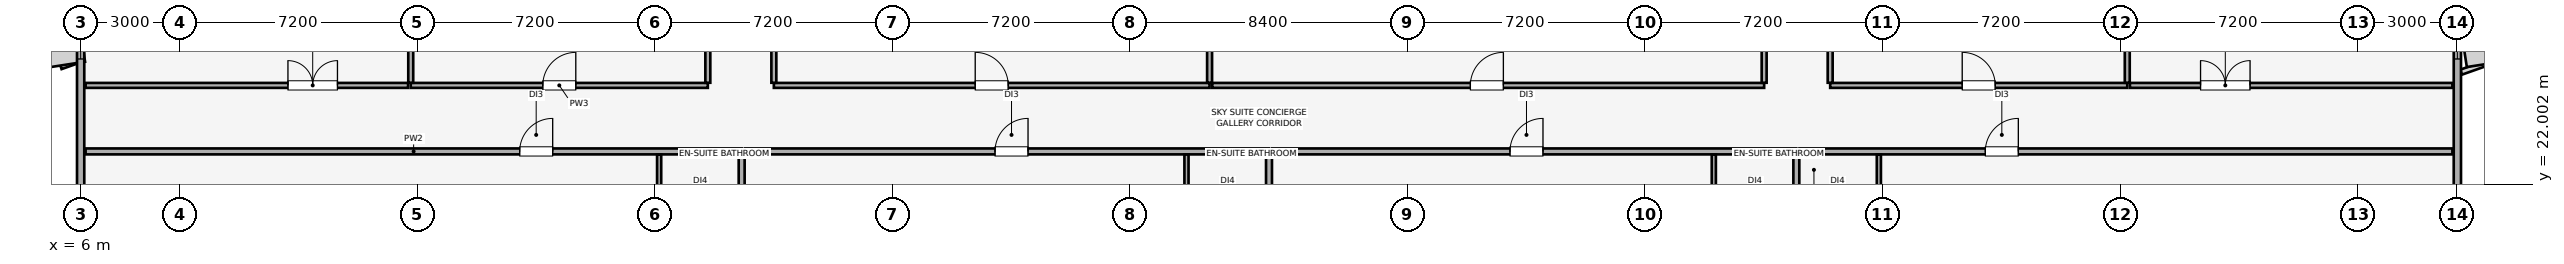
"""IFC4 building model, lengths in metres.
Left out: names, types, materials, properties, quantities, classifications, styles, units other than length and angle.
Written with IfcOpenShell. Run it as: python <this file> out.ifc"""

import sys

from ifc_helpers import new_model, si_unit, direction, frame, frame_2d, origin, place, context, subcontext, project, spatial, rectangle, extrude, element, fill, save


model = new_model("IFC4")
c1 = context("Model", 3, precision=1e-05, world=origin(), true_north=direction((0.0, 1.0)))
c2 = subcontext(c1, "Body", "Model", "MODEL_VIEW")
j1 = project(units=[si_unit("LENGTHUNIT", "METRE"), si_unit("PLANEANGLEUNIT", "RADIAN")], contexts=[c1])
p1 = place(None, origin())
s1 = spatial("IfcSite", under=j1, at=p1, CompositionType="ELEMENT")
p2 = place(p1, origin())
s2 = spatial("IfcBuilding", under=s1, at=p2, CompositionType="ELEMENT")
p3 = place(p2, frame((0.0, 0.0, 276.55)))
s3 = spatial("IfcBuildingStorey", under=s2, at=p3, CompositionType="ELEMENT", Elevation=276.55)
p4 = place(p3, frame((78.0, 9.8, 0.0), z_axis=(0.0, 0.0, 1.0), x_axis=(0.0, 1.0, 0.0)))
e1 = element("IfcWall", 1, at=p4, inside=s3, PredefinedType="SOLIDWALL", context=c2, shape_type="SweptSolid", body=[
    extrude(rectangle(XDim=35.4, YDim=0.22, at=frame_2d((17.7, 0.0))), origin(), (0.0, 0.0, 1.0), 2.8),
])
p5 = place(p4, frame((0.985, 0.0, 0.85)))
e2 = element("IfcOpeningElement", 2, at=p5, cuts=e1, PredefinedType="OPENING", context=c2, shape_type="SweptSolid", body=[
    extrude(rectangle(XDim=3.0, YDim=1.5, at=frame_2d((1.5, 0.75))), frame((0.0, 0.12, 0.0), z_axis=(0.0, -1.0, 0.0), x_axis=(1.0, 0.0, 0.0)), (0.0, 0.0, 1.0), 0.24),
])
p6 = place(p4, frame((7.6, 0.0, 0.85)))
e3 = element("IfcOpeningElement", 3, at=p6, cuts=e1, PredefinedType="OPENING", context=c2, shape_type="SweptSolid", body=[
    extrude(rectangle(XDim=3.6, YDim=1.65, at=frame_2d((1.8, 0.825))), frame((0.0, 0.12, 0.0), z_axis=(0.0, -1.0, 0.0), x_axis=(1.0, 0.0, 0.0)), (0.0, 0.0, 1.0), 0.24),
])
p7 = place(p4, frame((16.0, 0.0, 0.85)))
e4 = element("IfcOpeningElement", 4, at=p7, cuts=e1, PredefinedType="OPENING", context=c2, shape_type="SweptSolid", body=[
    extrude(rectangle(XDim=2.4, YDim=1.5, at=frame_2d((1.2, 0.75))), frame((0.0, 0.12, 0.0), z_axis=(0.0, -1.0, 0.0), x_axis=(1.0, 0.0, 0.0)), (0.0, 0.0, 1.0), 0.24),
])
p8 = place(p4, frame((20.815, 0.0, 0.85)))
e5 = element("IfcOpeningElement", 5, at=p8, cuts=e1, PredefinedType="OPENING", context=c2, shape_type="SweptSolid", body=[
    extrude(rectangle(XDim=3.0, YDim=1.5, at=frame_2d((1.5, 0.75))), frame((0.0, 0.12, 0.0), z_axis=(0.0, -1.0, 0.0), x_axis=(1.0, 0.0, 0.0)), (0.0, 0.0, 1.0), 0.24),
])
p9 = place(p4, frame((25.585, 0.0, 0.85)))
e6 = element("IfcOpeningElement", 6, at=p9, cuts=e1, PredefinedType="OPENING", context=c2, shape_type="SweptSolid", body=[
    extrude(rectangle(XDim=3.0, YDim=1.5, at=frame_2d((1.5, 0.75))), frame((0.0, 0.12, 0.0), z_axis=(0.0, -1.0, 0.0), x_axis=(1.0, 0.0, 0.0)), (0.0, 0.0, 1.0), 0.24),
])
p10 = place(p4, frame((30.915, 0.0, 0.85)))
e7 = element("IfcOpeningElement", 7, at=p10, cuts=e1, PredefinedType="OPENING", context=c2, shape_type="SweptSolid", body=[
    extrude(rectangle(XDim=3.6, YDim=1.65, at=frame_2d((1.8, 0.825))), frame((0.0, 0.12, 0.0), z_axis=(0.0, -1.0, 0.0), x_axis=(1.0, 0.0, 0.0)), (0.0, 0.0, 1.0), 0.24),
])
p11 = place(p3, frame((6.0, 45.2, 0.0), z_axis=(0.0, 0.0, 1.0), x_axis=(0.0, -1.0, 0.0)))
e8 = element("IfcWall", 8, at=p11, inside=s3, PredefinedType="SOLIDWALL", context=c2, shape_type="SweptSolid", body=[
    extrude(rectangle(XDim=35.4, YDim=0.22, at=frame_2d((17.7, 0.0))), origin(), (0.0, 0.0, 1.0), 2.8),
])
p12 = place(p11, frame((31.415, 0.0, 0.85)))
e9 = element("IfcOpeningElement", 9, at=p12, cuts=e8, PredefinedType="OPENING", context=c2, shape_type="SweptSolid", body=[
    extrude(rectangle(XDim=3.0, YDim=1.5, at=frame_2d((1.5, 0.75))), frame((0.0, 0.12, 0.0), z_axis=(0.0, -1.0, 0.0), x_axis=(1.0, 0.0, 0.0)), (0.0, 0.0, 1.0), 0.24),
])
p13 = place(p11, frame((24.2, 0.0, 0.85)))
e10 = element("IfcOpeningElement", 10, at=p13, cuts=e8, PredefinedType="OPENING", context=c2, shape_type="SweptSolid", body=[
    extrude(rectangle(XDim=3.6, YDim=1.65, at=frame_2d((1.8, 0.825))), frame((0.0, 0.12, 0.0), z_axis=(0.0, -1.0, 0.0), x_axis=(1.0, 0.0, 0.0)), (0.0, 0.0, 1.0), 0.24),
])
p14 = place(p11, frame((17.0, 0.0, 0.85)))
e11 = element("IfcOpeningElement", 11, at=p14, cuts=e8, PredefinedType="OPENING", context=c2, shape_type="SweptSolid", body=[
    extrude(rectangle(XDim=2.4, YDim=1.5, at=frame_2d((1.2, 0.75))), frame((0.0, 0.12, 0.0), z_axis=(0.0, -1.0, 0.0), x_axis=(1.0, 0.0, 0.0)), (0.0, 0.0, 1.0), 0.24),
])
p15 = place(p11, frame((11.585, 0.0, 0.85)))
e12 = element("IfcOpeningElement", 12, at=p15, cuts=e8, PredefinedType="OPENING", context=c2, shape_type="SweptSolid", body=[
    extrude(rectangle(XDim=3.0, YDim=1.5, at=frame_2d((1.5, 0.75))), frame((0.0, 0.12, 0.0), z_axis=(0.0, -1.0, 0.0), x_axis=(1.0, 0.0, 0.0)), (0.0, 0.0, 1.0), 0.24),
])
p16 = place(p11, frame((6.815, 0.0, 0.85)))
e13 = element("IfcOpeningElement", 13, at=p16, cuts=e8, PredefinedType="OPENING", context=c2, shape_type="SweptSolid", body=[
    extrude(rectangle(XDim=3.0, YDim=1.5, at=frame_2d((1.5, 0.75))), frame((0.0, 0.12, 0.0), z_axis=(0.0, -1.0, 0.0), x_axis=(1.0, 0.0, 0.0)), (0.0, 0.0, 1.0), 0.24),
])
p17 = place(p11, frame((0.885, 0.0, 0.85)))
e14 = element("IfcOpeningElement", 14, at=p17, cuts=e8, PredefinedType="OPENING", context=c2, shape_type="SweptSolid", body=[
    extrude(rectangle(XDim=3.6, YDim=1.65, at=frame_2d((1.8, 0.825))), frame((0.0, 0.12, 0.0), z_axis=(0.0, -1.0, 0.0), x_axis=(1.0, 0.0, 0.0)), (0.0, 0.0, 1.0), 0.24),
])
p18 = place(p3, frame((6.15, 23.0, 0.0), z_axis=(0.0, 0.0, 1.0), x_axis=(1.0, 0.0, 0.0)))
e15 = element("IfcWall", 15, at=p18, inside=s3, PredefinedType="PARTITIONING", context=c2, shape_type="SweptSolid", body=[
    extrude(rectangle(XDim=19.875, YDim=0.18, at=frame_2d((9.938, 0.0))), origin(), (0.0, 0.0, 1.0), 3.6),
])
p19 = place(p18, frame((13.15, 0.0, 0.0)))
e16 = element("IfcOpeningElement", 16, at=p19, cuts=e15, PredefinedType="OPENING", context=c2, shape_type="SweptSolid", body=[
    extrude(rectangle(XDim=1.0, YDim=2.15, at=frame_2d((0.5, 1.075))), frame((0.0, 0.1, 0.0), z_axis=(0.0, -1.0, 0.0), x_axis=(1.0, 0.0, 0.0)), (0.0, 0.0, 1.0), 0.2),
])
p20 = place(p3, frame((26.025, 6.15, 0.0), z_axis=(0.0, 0.0, 1.0), x_axis=(0.0, 1.0, 0.0)))
e17 = element("IfcWall", 17, at=p20, inside=s3, PredefinedType="PARTITIONING", context=c2, shape_type="SweptSolid", body=[
    extrude(rectangle(XDim=16.755, YDim=0.18, at=frame_2d((8.377, 0.0))), origin(), (0.0, 0.0, 1.0), 3.6),
])
p21 = place(p3, frame((23.525, 20.518, 0.0), z_axis=(0.0, 0.0, 1.0), x_axis=(0.0, 1.0, 0.0)))
e18 = element("IfcWall", 18, at=p21, inside=s3, PredefinedType="PARTITIONING", context=c2, shape_type="SweptSolid", body=[
    extrude(rectangle(XDim=2.387, YDim=0.125, at=frame_2d((1.194, 0.0))), origin(), (0.0, 0.0, 1.0), 3.1),
])
p22 = place(p3, frame((26.12, 23.0, 0.0), z_axis=(0.0, 0.0, 1.0), x_axis=(1.0, 0.0, 0.0)))
e19 = element("IfcWall", 19, at=p22, inside=s3, PredefinedType="PARTITIONING", context=c2, shape_type="SweptSolid", body=[
    extrude(rectangle(XDim=15.88, YDim=0.18, at=frame_2d((7.94, 0.0))), origin(), (0.0, 0.0, 1.0), 3.6),
])
p23 = place(p22, frame((7.58, 0.0, 0.0)))
e20 = element("IfcOpeningElement", 20, at=p23, cuts=e19, PredefinedType="OPENING", context=c2, shape_type="SweptSolid", body=[
    extrude(rectangle(XDim=1.0, YDim=2.15, at=frame_2d((0.5, 1.075))), frame((0.0, 0.1, 0.0), z_axis=(0.0, -1.0, 0.0), x_axis=(1.0, 0.0, 0.0)), (0.0, 0.0, 1.0), 0.2),
])
p24 = place(p3, frame((42.0, 6.15, 0.0), z_axis=(0.0, 0.0, 1.0), x_axis=(0.0, 1.0, 0.0)))
e21 = element("IfcWall", 21, at=p24, inside=s3, PredefinedType="PARTITIONING", context=c2, shape_type="SweptSolid", body=[
    extrude(rectangle(XDim=16.755, YDim=0.18, at=frame_2d((8.377, 0.0))), origin(), (0.0, 0.0, 1.0), 3.0),
])
p25 = place(p3, frame((39.5, 20.518, 0.0), z_axis=(0.0, 0.0, 1.0), x_axis=(0.0, 1.0, 0.0)))
e22 = element("IfcWall", 22, at=p25, inside=s3, PredefinedType="PARTITIONING", context=c2, shape_type="SweptSolid", body=[
    extrude(rectangle(XDim=2.387, YDim=0.125, at=frame_2d((1.194, 0.0))), origin(), (0.0, 0.0, 1.0), 3.6),
])
p26 = place(p3, frame((42.095, 23.0, 0.0), z_axis=(0.0, 0.0, 1.0), x_axis=(1.0, 0.0, 0.0)))
e23 = element("IfcWall", 23, at=p26, inside=s3, PredefinedType="PARTITIONING", context=c2, shape_type="SweptSolid", body=[
    extrude(rectangle(XDim=15.88, YDim=0.18, at=frame_2d((7.94, 0.0))), origin(), (0.0, 0.0, 1.0), 3.6),
])
p27 = place(p26, frame((7.205, 0.0, 0.0)))
e24 = element("IfcOpeningElement", 24, at=p27, cuts=e23, PredefinedType="OPENING", context=c2, shape_type="SweptSolid", body=[
    extrude(rectangle(XDim=1.0, YDim=2.15, at=frame_2d((0.5, 1.075))), frame((0.0, 0.1, 0.0), z_axis=(0.0, -1.0, 0.0), x_axis=(1.0, 0.0, 0.0)), (0.0, 0.0, 1.0), 0.2),
])
p28 = place(p3, frame((57.975, 6.15, 0.0), z_axis=(0.0, 0.0, 1.0), x_axis=(0.0, 1.0, 0.0)))
e25 = element("IfcWall", 25, at=p28, inside=s3, PredefinedType="PARTITIONING", context=c2, shape_type="SweptSolid", body=[
    extrude(rectangle(XDim=16.755, YDim=0.18, at=frame_2d((8.377, 0.0))), origin(), (0.0, 0.0, 1.0), 3.6),
])
p29 = place(p3, frame((55.475, 20.518, 0.0), z_axis=(0.0, 0.0, 1.0), x_axis=(0.0, 1.0, 0.0)))
e26 = element("IfcWall", 26, at=p29, inside=s3, PredefinedType="PARTITIONING", context=c2, shape_type="SweptSolid", body=[
    extrude(rectangle(XDim=2.387, YDim=0.125, at=frame_2d((1.194, 0.0))), origin(), (0.0, 0.0, 1.0), 3.6),
])
p30 = place(p3, frame((58.07, 23.0, 0.0), z_axis=(0.0, 0.0, 1.0), x_axis=(1.0, 0.0, 0.0)))
e27 = element("IfcWall", 27, at=p30, inside=s3, PredefinedType="PARTITIONING", context=c2, shape_type="SweptSolid", body=[
    extrude(rectangle(XDim=19.78, YDim=0.18, at=frame_2d((9.89, 0.0))), origin(), (0.0, 0.0, 1.0), 3.6),
])
p31 = place(p30, frame((5.63, 0.0, 0.0)))
e28 = element("IfcOpeningElement", 28, at=p31, cuts=e27, PredefinedType="OPENING", context=c2, shape_type="SweptSolid", body=[
    extrude(rectangle(XDim=1.0, YDim=2.15, at=frame_2d((0.5, 1.075))), frame((0.0, 0.1, 0.0), z_axis=(0.0, -1.0, 0.0), x_axis=(1.0, 0.0, 0.0)), (0.0, 0.0, 1.0), 0.2),
])
p32 = place(p3, frame((60.475, 20.518, 0.0), z_axis=(0.0, 0.0, 1.0), x_axis=(0.0, 1.0, 0.0)))
e29 = element("IfcWall", 29, at=p32, inside=s3, PredefinedType="PARTITIONING", context=c2, shape_type="SweptSolid", body=[
    extrude(rectangle(XDim=2.387, YDim=0.125, at=frame_2d((1.194, 0.0))), origin(), (0.0, 0.0, 1.0), 3.1),
])
p33 = place(p3, frame((16.0, 25.0, 0.0), z_axis=(0.0, 0.0, 1.0), x_axis=(1.0, 0.0, 0.0)))
e30 = element("IfcWall", 30, at=p33, inside=s3, PredefinedType="PARTITIONING", context=c2, shape_type="SweptSolid", body=[
    extrude(rectangle(XDim=9.0, YDim=0.15, at=frame_2d((4.5, 0.0))), origin(), (0.0, 0.0, 1.0), 3.6),
])
p34 = place(p33, frame((4.0, 0.0, 0.0)))
e31 = element("IfcOpeningElement", 31, at=p34, cuts=e30, PredefinedType="OPENING", context=c2, shape_type="SweptSolid", body=[
    extrude(rectangle(XDim=1.0, YDim=2.15, at=frame_2d((0.5, 1.075))), frame((0.0, 0.085, 0.0), z_axis=(0.0, -1.0, 0.0), x_axis=(1.0, 0.0, 0.0)), (0.0, 0.0, 1.0), 0.17),
])
p35 = place(p3, frame((16.0, 25.08, 0.0), z_axis=(0.0, 0.0, 1.0), x_axis=(0.0, 1.0, 0.0)))
e32 = element("IfcWall", 32, at=p35, inside=s3, PredefinedType="PARTITIONING", context=c2, shape_type="SweptSolid", body=[
    extrude(rectangle(XDim=4.31, YDim=0.15, at=frame_2d((2.155, 0.0))), origin(), (0.0, 0.0, 1.0), 3.1),
])
p36 = place(p3, frame((25.0, 25.08, 0.0), z_axis=(0.0, 0.0, 1.0), x_axis=(0.0, 1.0, 0.0)))
e33 = element("IfcWall", 33, at=p36, inside=s3, PredefinedType="PARTITIONING", context=c2, shape_type="SweptSolid", body=[
    extrude(rectangle(XDim=4.24, YDim=0.15, at=frame_2d((2.12, 0.0))), origin(), (0.0, 0.0, 1.0), 3.6),
])
p37 = place(p3, frame((27.0, 25.0, 0.0), z_axis=(0.0, 0.0, 1.0), x_axis=(1.0, 0.0, 0.0)))
e34 = element("IfcWall", 34, at=p37, inside=s3, PredefinedType="PARTITIONING", context=c2, shape_type="SweptSolid", body=[
    extrude(rectangle(XDim=13.2, YDim=0.15, at=frame_2d((6.6, 0.0))), origin(), (0.0, 0.0, 1.0), 3.6),
])
p38 = place(p37, frame((6.1, 0.0, 0.0)))
e35 = element("IfcOpeningElement", 35, at=p38, cuts=e34, PredefinedType="OPENING", context=c2, shape_type="SweptSolid", body=[
    extrude(rectangle(XDim=1.0, YDim=2.15, at=frame_2d((0.5, 1.075))), frame((0.0, 0.085, 0.0), z_axis=(0.0, -1.0, 0.0), x_axis=(1.0, 0.0, 0.0)), (0.0, 0.0, 1.0), 0.17),
])
p39 = place(p3, frame((27.0, 25.08, 0.0), z_axis=(0.0, 0.0, 1.0), x_axis=(0.0, 1.0, 0.0)))
e36 = element("IfcWall", 36, at=p39, inside=s3, PredefinedType="PARTITIONING", context=c2, shape_type="SweptSolid", body=[
    extrude(rectangle(XDim=4.24, YDim=0.15, at=frame_2d((2.12, 0.0))), origin(), (0.0, 0.0, 1.0), 3.1),
])
p40 = place(p3, frame((40.2, 25.08, 0.0), z_axis=(0.0, 0.0, 1.0), x_axis=(0.0, 1.0, 0.0)))
e37 = element("IfcWall", 37, at=p40, inside=s3, PredefinedType="PARTITIONING", context=c2, shape_type="SweptSolid", body=[
    extrude(rectangle(XDim=4.24, YDim=0.15, at=frame_2d((2.12, 0.0))), origin(), (0.0, 0.0, 1.0), 3.6),
])
p41 = place(p3, frame((40.28, 25.0, 0.0), z_axis=(0.0, 0.0, 1.0), x_axis=(1.0, 0.0, 0.0)))
e38 = element("IfcWall", 38, at=p41, inside=s3, PredefinedType="PARTITIONING", context=c2, shape_type="SweptSolid", body=[
    extrude(rectangle(XDim=16.72, YDim=0.15, at=frame_2d((8.36, 0.0))), origin(), (0.0, 0.0, 1.0), 3.6),
])
p42 = place(p41, frame((7.82, 0.0, 0.0)))
e39 = element("IfcOpeningElement", 39, at=p42, cuts=e38, PredefinedType="OPENING", context=c2, shape_type="SweptSolid", body=[
    extrude(rectangle(XDim=1.0, YDim=2.15, at=frame_2d((0.5, 1.075))), frame((0.0, 0.085, 0.0), z_axis=(0.0, -1.0, 0.0), x_axis=(1.0, 0.0, 0.0)), (0.0, 0.0, 1.0), 0.17),
])
p43 = place(p3, frame((57.0, 25.08, 0.0), z_axis=(0.0, 0.0, 1.0), x_axis=(0.0, 1.0, 0.0)))
e40 = element("IfcWall", 40, at=p43, inside=s3, PredefinedType="PARTITIONING", context=c2, shape_type="SweptSolid", body=[
    extrude(rectangle(XDim=4.24, YDim=0.15, at=frame_2d((2.12, 0.0))), origin(), (0.0, 0.0, 1.0), 3.1),
])
p44 = place(p3, frame((59.0, 25.0, 0.0), z_axis=(0.0, 0.0, 1.0), x_axis=(1.0, 0.0, 0.0)))
e41 = element("IfcWall", 41, at=p44, inside=s3, PredefinedType="PARTITIONING", context=c2, shape_type="SweptSolid", body=[
    extrude(rectangle(XDim=9.0, YDim=0.15, at=frame_2d((4.5, 0.0))), origin(), (0.0, 0.0, 1.0), 3.6),
])
p45 = place(p44, frame((4.0, 0.0, 0.0)))
e42 = element("IfcOpeningElement", 42, at=p45, cuts=e41, PredefinedType="OPENING", context=c2, shape_type="SweptSolid", body=[
    extrude(rectangle(XDim=1.0, YDim=2.15, at=frame_2d((0.5, 1.075))), frame((0.0, 0.085, 0.0), z_axis=(0.0, -1.0, 0.0), x_axis=(1.0, 0.0, 0.0)), (0.0, 0.0, 1.0), 0.17),
])
p46 = place(p3, frame((59.0, 25.08, 0.0), z_axis=(0.0, 0.0, 1.0), x_axis=(0.0, 1.0, 0.0)))
e43 = element("IfcWall", 43, at=p46, inside=s3, PredefinedType="PARTITIONING", context=c2, shape_type="SweptSolid", body=[
    extrude(rectangle(XDim=4.24, YDim=0.15, at=frame_2d((2.12, 0.0))), origin(), (0.0, 0.0, 1.0), 3.6),
])
p47 = place(p3, frame((68.0, 25.08, 0.0), z_axis=(0.0, 0.0, 1.0), x_axis=(0.0, 1.0, 0.0)))
e44 = element("IfcWall", 44, at=p47, inside=s3, PredefinedType="PARTITIONING", context=c2, shape_type="SweptSolid", body=[
    extrude(rectangle(XDim=4.31, YDim=0.15, at=frame_2d((2.155, 0.0))), origin(), (0.0, 0.0, 1.0), 3.1),
])
p48 = place(p3, frame((6.15, 25.0, 0.0), z_axis=(0.0, 0.0, 1.0), x_axis=(1.0, 0.0, 0.0)))
e45 = element("IfcWall", 45, at=p48, inside=s3, PredefinedType="PARTITIONING", context=c2, shape_type="SweptSolid", body=[
    extrude(rectangle(XDim=9.77, YDim=0.15, at=frame_2d((4.885, 0.0))), origin(), (0.0, 0.0, 1.0), 3.6),
])
p49 = place(p48, frame((6.13, 0.0, 0.0)))
e46 = element("IfcOpeningElement", 46, at=p49, cuts=e45, PredefinedType="OPENING", context=c2, shape_type="SweptSolid", body=[
    extrude(rectangle(XDim=1.5, YDim=2.25, at=frame_2d((0.75, 1.125))), frame((0.0, 0.085, 0.0), z_axis=(0.0, -1.0, 0.0), x_axis=(1.0, 0.0, 0.0)), (0.0, 0.0, 1.0), 0.17),
])
p50 = place(p3, frame((68.08, 25.0, 0.0), z_axis=(0.0, 0.0, 1.0), x_axis=(1.0, 0.0, 0.0)))
e47 = element("IfcWall", 47, at=p50, inside=s3, PredefinedType="PARTITIONING", context=c2, shape_type="SweptSolid", body=[
    extrude(rectangle(XDim=9.77, YDim=0.15, at=frame_2d((4.885, 0.0))), origin(), (0.0, 0.0, 1.0), 3.6),
])
p51 = place(p50, frame((2.14, 0.0, 0.0)))
e48 = element("IfcOpeningElement", 48, at=p51, cuts=e47, PredefinedType="OPENING", context=c2, shape_type="SweptSolid", body=[
    extrude(rectangle(XDim=1.5, YDim=2.25, at=frame_2d((0.75, 1.125))), frame((0.0, 0.085, 0.0), z_axis=(0.0, -1.0, 0.0), x_axis=(1.0, 0.0, 0.0)), (0.0, 0.0, 1.0), 0.17),
])
p52 = place(p7, origin())
e49 = element("IfcWindow", 49, at=p52, inside=s3, PartitioningType="SINGLE_PANEL", PredefinedType="WINDOW", context=c2, shape_type="SweptSolid", body=[
    extrude(rectangle(XDim=2.4, YDim=1.5, at=frame_2d((1.2, 0.75))), frame((0.0, 0.03, 0.0), z_axis=(0.0, -1.0, 0.0), x_axis=(1.0, 0.0, 0.0)), (0.0, 0.0, 1.0), 0.06),
])
fill(e4, e49)
p53 = place(p14, origin())
e50 = element("IfcWindow", 50, at=p53, inside=s3, PartitioningType="SINGLE_PANEL", PredefinedType="WINDOW", context=c2, shape_type="SweptSolid", body=[
    extrude(rectangle(XDim=2.4, YDim=1.5, at=frame_2d((1.2, 0.75))), frame((0.0, 0.03, 0.0), z_axis=(0.0, -1.0, 0.0), x_axis=(1.0, 0.0, 0.0)), (0.0, 0.0, 1.0), 0.06),
])
fill(e11, e50)
p54 = place(p19, origin())
e51 = element("IfcDoor", 51, at=p54, inside=s3, OperationType="SINGLE_SWING_RIGHT", PredefinedType="DOOR", context=c2, shape_type="SweptSolid", body=[
    extrude(rectangle(XDim=1.0, YDim=2.15, at=frame_2d((0.5, 1.075))), frame((0.0, 0.025, 0.0), z_axis=(0.0, -1.0, 0.0), x_axis=(1.0, 0.0, 0.0)), (0.0, 0.0, 1.0), 0.05),
])
fill(e16, e51)
p55 = place(p23, origin())
e52 = element("IfcDoor", 52, at=p55, inside=s3, OperationType="SINGLE_SWING_RIGHT", PredefinedType="DOOR", context=c2, shape_type="SweptSolid", body=[
    extrude(rectangle(XDim=1.0, YDim=2.15, at=frame_2d((0.5, 1.075))), frame((0.0, 0.025, 0.0), z_axis=(0.0, -1.0, 0.0), x_axis=(1.0, 0.0, 0.0)), (0.0, 0.0, 1.0), 0.05),
])
fill(e20, e52)
p56 = place(p27, origin())
e53 = element("IfcDoor", 53, at=p56, inside=s3, OperationType="SINGLE_SWING_RIGHT", PredefinedType="DOOR", context=c2, shape_type="SweptSolid", body=[
    extrude(rectangle(XDim=1.0, YDim=2.15, at=frame_2d((0.5, 1.075))), frame((0.0, 0.025, 0.0), z_axis=(0.0, -1.0, 0.0), x_axis=(1.0, 0.0, 0.0)), (0.0, 0.0, 1.0), 0.05),
])
fill(e24, e53)
p57 = place(p31, origin())
e54 = element("IfcDoor", 54, at=p57, inside=s3, OperationType="SINGLE_SWING_RIGHT", PredefinedType="DOOR", context=c2, shape_type="SweptSolid", body=[
    extrude(rectangle(XDim=1.0, YDim=2.15, at=frame_2d((0.5, 1.075))), frame((0.0, 0.025, 0.0), z_axis=(0.0, -1.0, 0.0), x_axis=(1.0, 0.0, 0.0)), (0.0, 0.0, 1.0), 0.05),
])
fill(e28, e54)
p58 = place(p34, origin())
e55 = element("IfcDoor", 55, at=p58, inside=s3, OperationType="SINGLE_SWING_RIGHT", PredefinedType="DOOR", context=c2, shape_type="SweptSolid", body=[
    extrude(rectangle(XDim=1.0, YDim=2.15, at=frame_2d((0.5, 1.075))), frame((0.0, 0.025, 0.0), z_axis=(0.0, -1.0, 0.0), x_axis=(1.0, 0.0, 0.0)), (0.0, 0.0, 1.0), 0.05),
])
fill(e31, e55)
p59 = place(p38, origin())
e56 = element("IfcDoor", 56, at=p59, inside=s3, OperationType="SINGLE_SWING_LEFT", PredefinedType="DOOR", context=c2, shape_type="SweptSolid", body=[
    extrude(rectangle(XDim=1.0, YDim=2.15, at=frame_2d((0.5, 1.075))), frame((0.0, 0.025, 0.0), z_axis=(0.0, -1.0, 0.0), x_axis=(1.0, 0.0, 0.0)), (0.0, 0.0, 1.0), 0.05),
])
fill(e35, e56)
p60 = place(p42, origin())
e57 = element("IfcDoor", 57, at=p60, inside=s3, OperationType="SINGLE_SWING_RIGHT", PredefinedType="DOOR", context=c2, shape_type="SweptSolid", body=[
    extrude(rectangle(XDim=1.0, YDim=2.15, at=frame_2d((0.5, 1.075))), frame((0.0, 0.025, 0.0), z_axis=(0.0, -1.0, 0.0), x_axis=(1.0, 0.0, 0.0)), (0.0, 0.0, 1.0), 0.05),
])
fill(e39, e57)
p61 = place(p45, origin())
e58 = element("IfcDoor", 58, at=p61, inside=s3, OperationType="SINGLE_SWING_LEFT", PredefinedType="DOOR", context=c2, shape_type="SweptSolid", body=[
    extrude(rectangle(XDim=1.0, YDim=2.15, at=frame_2d((0.5, 1.075))), frame((0.0, 0.025, 0.0), z_axis=(0.0, -1.0, 0.0), x_axis=(1.0, 0.0, 0.0)), (0.0, 0.0, 1.0), 0.05),
])
fill(e42, e58)
p62 = place(p49, origin())
e59 = element("IfcDoor", 59, at=p62, inside=s3, OperationType="DOUBLE_DOOR_SINGLE_SWING", PredefinedType="DOOR", context=c2, shape_type="SweptSolid", body=[
    extrude(rectangle(XDim=1.5, YDim=2.25, at=frame_2d((0.75, 1.125))), frame((0.0, 0.025, 0.0), z_axis=(0.0, -1.0, 0.0), x_axis=(1.0, 0.0, 0.0)), (0.0, 0.0, 1.0), 0.05),
])
fill(e46, e59)
p63 = place(p51, origin())
e60 = element("IfcDoor", 60, at=p63, inside=s3, OperationType="DOUBLE_DOOR_SINGLE_SWING", PredefinedType="DOOR", context=c2, shape_type="SweptSolid", body=[
    extrude(rectangle(XDim=1.5, YDim=2.25, at=frame_2d((0.75, 1.125))), frame((0.0, 0.025, 0.0), z_axis=(0.0, -1.0, 0.0), x_axis=(1.0, 0.0, 0.0)), (0.0, 0.0, 1.0), 0.05),
])
fill(e48, e60)
save(model, sys.argv[1])
